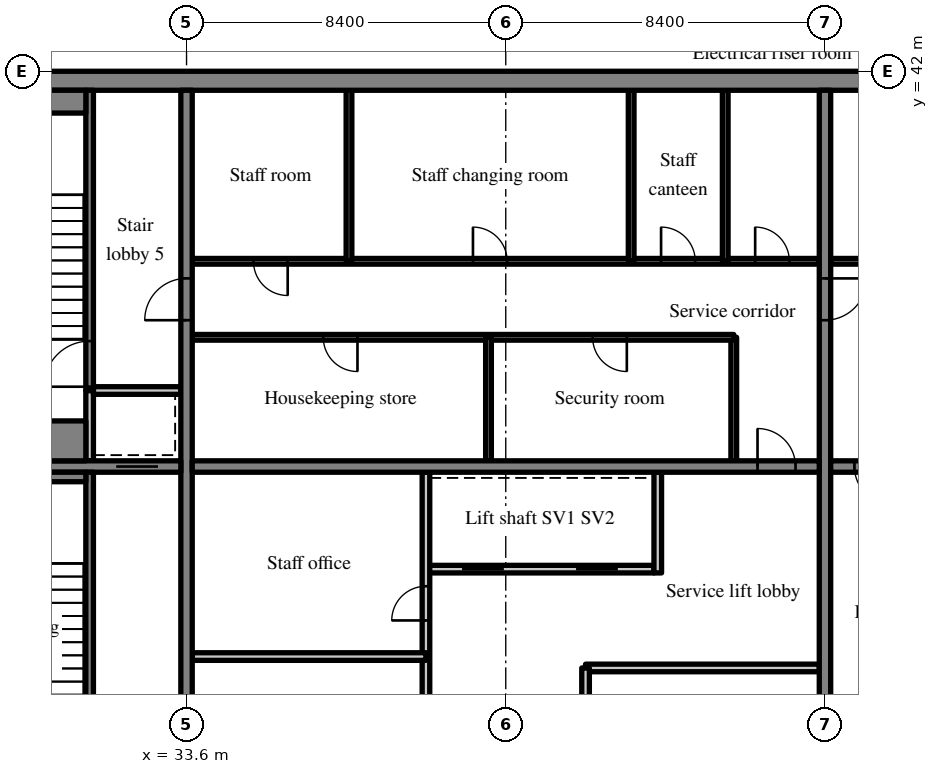
"""IFC4 building model, lengths in metres.
Left out: names, types, materials, properties, quantities, classifications, styles, units other than length and angle.
Written with IfcOpenShell. Run it as: python <this file> out.ifc"""

import sys

from ifc_helpers import new_model, si_unit, direction, frame, frame_2d, origin, place, context, subcontext, project, spatial, rectangle, extrude, source, transform, mapped, element, fill, save


model = new_model("IFC4")
c1 = context("Model", 3, precision=1e-05, world=origin(), true_north=direction((0.0, 1.0)))
c2 = subcontext(c1, "Body", "Model", "MODEL_VIEW")
j1 = project(units=[si_unit("LENGTHUNIT", "METRE"), si_unit("PLANEANGLEUNIT", "RADIAN")], contexts=[c1])
p1 = place(None, origin())
s1 = spatial("IfcSite", under=j1, at=p1, CompositionType="ELEMENT")
p2 = place(p1, origin())
s2 = spatial("IfcBuilding", under=s1, at=p2, CompositionType="ELEMENT")
p3 = place(p2, frame((0.0, 0.0, 305.7)))
s3 = spatial("IfcBuildingStorey", under=s2, at=p3, CompositionType="ELEMENT", Elevation=305.7)
m1 = source(origin(), c2, "Body", "SweptSolid", [
    extrude(rectangle(XDim=50.4, YDim=0.5, at=frame_2d((25.2, 0.0))), origin(), (0.0, 0.0, 1.0), 3.72),
])
p4 = place(p3, frame((25.2, 41.75, 0.0), z_axis=(0.0, 0.0, 1.0), x_axis=(1.0, 0.0, 0.0)))
e1 = element("IfcWall", 1, at=p4, inside=s3, PredefinedType="SHEAR", context=c2, shape_type="MappedRepresentation", body=[
    mapped(m1, transform((0.0, 0.0, 0.0), scale=1.0)),
])
m2 = source(origin(), c2, "Body", "SweptSolid", [
    extrude(rectangle(XDim=19.0, YDim=0.3, at=frame_2d((9.5, 0.0))), origin(), (0.0, 0.0, 1.0), 3.72),
])
p5 = place(p3, frame((33.6, 22.5, 0.0), z_axis=(0.0, 0.0, 1.0), x_axis=(0.0, 1.0, 0.0)))
e2 = element("IfcWall", 2, at=p5, inside=s3, PredefinedType="SHEAR", context=c2, shape_type="MappedRepresentation", body=[
    mapped(m2, transform((0.0, 0.0, 0.0), scale=1.0)),
])
m3 = source(origin(), c2, "Body", "SweptSolid", [
    extrude(rectangle(XDim=1.1, YDim=2.1, at=frame_2d((0.55, 1.05))), frame((0.0, 0.16, 0.0), z_axis=(0.0, -1.0, 0.0), x_axis=(1.0, 0.0, 0.0)), (0.0, 0.0, 1.0), 0.32),
])
p6 = place(p5, frame((12.95, 0.0, 0.0)))
e3 = element("IfcOpeningElement", 3, at=p6, cuts=e2, PredefinedType="OPENING", context=c2, shape_type="MappedRepresentation", body=[
    mapped(m3, transform((0.0, 0.0, 0.0), scale=1.0)),
])
p7 = place(p3, frame((50.4, 22.5, 0.0), z_axis=(0.0, 0.0, 1.0), x_axis=(0.0, 1.0, 0.0)))
e4 = element("IfcWall", 4, at=p7, inside=s3, PredefinedType="SHEAR", context=c2, shape_type="MappedRepresentation", body=[
    mapped(m2, transform((0.0, 0.0, 0.0), scale=1.0)),
])
p8 = place(p7, frame((12.95, 0.0, 0.0)))
e5 = element("IfcOpeningElement", 5, at=p8, cuts=e4, PredefinedType="OPENING", context=c2, shape_type="MappedRepresentation", body=[
    mapped(m3, transform((0.0, 0.0, 0.0), scale=1.0)),
])
m4 = source(origin(), c2, "Body", "SweptSolid", [
    extrude(rectangle(XDim=7.75, YDim=0.3, at=frame_2d((3.875, 0.0))), origin(), (0.0, 0.0, 1.0), 3.72),
])
p9 = place(p3, frame((25.7, 31.6, 0.0), z_axis=(0.0, 0.0, 1.0), x_axis=(1.0, 0.0, 0.0)))
e6 = element("IfcWall", 6, at=p9, inside=s3, PredefinedType="SHEAR", context=c2, shape_type="MappedRepresentation", body=[
    mapped(m4, transform((0.0, 0.0, 0.0), scale=1.0)),
])
p10 = place(p9, frame((6.05, 0.0, 0.0)))
e7 = element("IfcOpeningElement", 7, at=p10, cuts=e6, PredefinedType="OPENING", context=c2, shape_type="MappedRepresentation", body=[
    mapped(m3, transform((0.0, 0.0, 0.0), scale=1.0)),
])
m5 = source(origin(), c2, "Body", "SweptSolid", [
    extrude(rectangle(XDim=16.5, YDim=0.3, at=frame_2d((8.25, 0.0))), origin(), (0.0, 0.0, 1.0), 3.72),
])
p11 = place(p3, frame((33.75, 31.6, 0.0), z_axis=(0.0, 0.0, 1.0), x_axis=(1.0, 0.0, 0.0)))
e8 = element("IfcWall", 8, at=p11, inside=s3, PredefinedType="SHEAR", context=c2, shape_type="MappedRepresentation", body=[
    mapped(m5, transform((0.0, 0.0, 0.0), scale=1.0)),
])
m6 = source(origin(), c2, "Body", "SweptSolid", [
    extrude(rectangle(XDim=1.0, YDim=2.1, at=frame_2d((0.5, 1.05))), frame((0.0, 0.16, 0.0), z_axis=(0.0, -1.0, 0.0), x_axis=(1.0, 0.0, 0.0)), (0.0, 0.0, 1.0), 0.32),
])
p12 = place(p11, frame((14.875, 0.0, 0.0)))
e9 = element("IfcOpeningElement", 9, at=p12, cuts=e8, PredefinedType="OPENING", context=c2, shape_type="MappedRepresentation", body=[
    mapped(m6, transform((0.0, 0.0, 0.0), scale=1.0)),
])
p13 = place(p3, frame((50.55, 31.6, 0.0), z_axis=(0.0, 0.0, 1.0), x_axis=(1.0, 0.0, 0.0)))
e10 = element("IfcWall", 10, at=p13, inside=s3, PredefinedType="SHEAR", context=c2, shape_type="MappedRepresentation", body=[
    mapped(m5, transform((0.0, 0.0, 0.0), scale=1.0)),
])
p14 = place(p13, frame((0.625, 0.0, 0.0)))
e11 = element("IfcOpeningElement", 11, at=p14, cuts=e10, PredefinedType="OPENING", context=c2, shape_type="MappedRepresentation", body=[
    mapped(m6, transform((0.0, 0.0, 0.0), scale=1.0)),
])
m7 = source(origin(), c2, "Body", "SweptSolid", [
    extrude(rectangle(XDim=6.0, YDim=0.2, at=frame_2d((3.0, 0.0))), origin(), (0.0, 0.0, 1.0), 3.72),
])
p15 = place(p3, frame((39.9, 28.9, 0.0), z_axis=(0.0, 0.0, 1.0), x_axis=(1.0, 0.0, 0.0)))
e12 = element("IfcWall", 12, at=p15, inside=s3, PredefinedType="SOLIDWALL", context=c2, shape_type="MappedRepresentation", body=[
    mapped(m7, transform((0.0, 0.0, 0.0), scale=1.0)),
])
m8 = source(origin(), c2, "Body", "SweptSolid", [
    extrude(rectangle(XDim=1.1, YDim=2.1, at=frame_2d((0.55, 1.05))), frame((0.0, 0.11, 0.0), z_axis=(0.0, -1.0, 0.0), x_axis=(1.0, 0.0, 0.0)), (0.0, 0.0, 1.0), 0.22),
])
p16 = place(p15, frame((0.95, 0.0, 0.0)))
e13 = element("IfcOpeningElement", 13, at=p16, cuts=e12, PredefinedType="OPENING", context=c2, shape_type="MappedRepresentation", body=[
    mapped(m8, transform((0.0, 0.0, 0.0), scale=1.0)),
])
p17 = place(p15, frame((3.95, 0.0, 0.0)))
e14 = element("IfcOpeningElement", 14, at=p17, cuts=e12, PredefinedType="OPENING", context=c2, shape_type="MappedRepresentation", body=[
    mapped(m8, transform((0.0, 0.0, 0.0), scale=1.0)),
])
m9 = source(origin(), c2, "Body", "SweptSolid", [
    extrude(rectangle(XDim=8.95, YDim=0.2, at=frame_2d((4.475, 0.0))), origin(), (0.0, 0.0, 1.0), 3.72),
])
p18 = place(p3, frame((39.9, 22.5, 0.0), z_axis=(0.0, 0.0, 1.0), x_axis=(0.0, 1.0, 0.0)))
e15 = element("IfcWall", 15, at=p18, inside=s3, PredefinedType="PARTITIONING", context=c2, shape_type="MappedRepresentation", body=[
    mapped(m9, transform((0.0, 0.0, 0.0), scale=1.0)),
])
m10 = source(origin(), c2, "Body", "SweptSolid", [
    extrude(rectangle(XDim=0.9, YDim=2.1, at=frame_2d((0.45, 1.05))), frame((0.0, 0.11, 0.0), z_axis=(0.0, -1.0, 0.0), x_axis=(1.0, 0.0, 0.0)), (0.0, 0.0, 1.0), 0.22),
])
p19 = place(p18, frame((5.05, 0.0, 0.0)))
e16 = element("IfcOpeningElement", 16, at=p19, cuts=e15, PredefinedType="OPENING", context=c2, shape_type="MappedRepresentation", body=[
    mapped(m10, transform((0.0, 0.0, 0.0), scale=1.0)),
])
m11 = source(origin(), c2, "Body", "SweptSolid", [
    extrude(rectangle(XDim=2.65, YDim=0.2, at=frame_2d((1.325, 0.0))), origin(), (0.0, 0.0, 1.0), 3.72),
])
p20 = place(p3, frame((46.0, 28.8, 0.0), z_axis=(0.0, 0.0, 1.0), x_axis=(0.0, 1.0, 0.0)))
e17 = element("IfcWall", 17, at=p20, inside=s3, PredefinedType="SOLIDWALL", context=c2, shape_type="MappedRepresentation", body=[
    mapped(m11, transform((0.0, 0.0, 0.0), scale=1.0)),
])
m12 = source(origin(), c2, "Body", "SweptSolid", [
    extrude(rectangle(XDim=6.15, YDim=0.2, at=frame_2d((3.075, 0.0))), origin(), (0.0, 0.0, 1.0), 3.72),
])
for number, where, z_axis, x_axis in (
    (18, (33.75, 26.6, 0.0), (0.0, 0.0, 1.0), (1.0, 0.0, 0.0)),
    (19, (44.1, 26.3, 0.0), (0.0, 0.0, 1.0), (1.0, 0.0, 0.0)),
):
    element("IfcWall", number, at=place(p3, frame(where, z_axis=z_axis, x_axis=x_axis)), inside=s3, PredefinedType="PARTITIONING", context=c2, shape_type="MappedRepresentation", body=[
        mapped(m12, transform((0.0, 0.0, 0.0), scale=1.0)),
    ])
m13 = source(origin(), c2, "Body", "SweptSolid", [
    extrude(rectangle(XDim=1.0, YDim=0.2, at=frame_2d((0.5, 0.0))), origin(), (0.0, 0.0, 1.0), 3.72),
])
p21 = place(p3, frame((44.1, 25.3, 0.0), z_axis=(0.0, 0.0, 1.0), x_axis=(0.0, 1.0, 0.0)))
e20 = element("IfcWall", 20, at=p21, inside=s3, PredefinedType="PARTITIONING", context=c2, shape_type="MappedRepresentation", body=[
    mapped(m13, transform((0.0, 0.0, 0.0), scale=1.0)),
])
m14 = source(origin(), c2, "Body", "SweptSolid", [
    extrude(rectangle(XDim=3.25, YDim=0.15, at=frame_2d((1.625, 0.0))), origin(), (0.0, 0.0, 1.0), 3.72),
])
p22 = place(p3, frame((48.0, 31.75, 0.0), z_axis=(0.0, 0.0, 1.0), x_axis=(0.0, 1.0, 0.0)))
e21 = element("IfcWall", 21, at=p22, inside=s3, PredefinedType="PARTITIONING", context=c2, shape_type="MappedRepresentation", body=[
    mapped(m14, transform((0.0, 0.0, 0.0), scale=1.0)),
])
m15 = source(origin(), c2, "Body", "SweptSolid", [
    extrude(rectangle(XDim=14.25, YDim=0.15, at=frame_2d((7.125, 0.0))), origin(), (0.0, 0.0, 1.0), 3.72),
])
p23 = place(p3, frame((33.75, 35.0, 0.0), z_axis=(0.0, 0.0, 1.0), x_axis=(1.0, 0.0, 0.0)))
e22 = element("IfcWall", 22, at=p23, inside=s3, PredefinedType="PARTITIONING", context=c2, shape_type="MappedRepresentation", body=[
    mapped(m15, transform((0.0, 0.0, 0.0), scale=1.0)),
])
m16 = source(origin(), c2, "Body", "SweptSolid", [
    extrude(rectangle(XDim=0.9, YDim=2.1, at=frame_2d((0.45, 1.05))), frame((0.0, 0.085, 0.0), z_axis=(0.0, -1.0, 0.0), x_axis=(1.0, 0.0, 0.0)), (0.0, 0.0, 1.0), 0.17),
])
p24 = place(p23, frame((3.448, 0.0, 0.0)))
e23 = element("IfcOpeningElement", 23, at=p24, cuts=e22, PredefinedType="OPENING", context=c2, shape_type="MappedRepresentation", body=[
    mapped(m16, transform((0.0, 0.0, 0.0), scale=1.0)),
])
p25 = place(p23, frame((10.536, 0.0, 0.0)))
e24 = element("IfcOpeningElement", 24, at=p25, cuts=e22, PredefinedType="OPENING", context=c2, shape_type="MappedRepresentation", body=[
    mapped(m16, transform((0.0, 0.0, 0.0), scale=1.0)),
])
m17 = source(origin(), c2, "Body", "SweptSolid", [
    extrude(rectangle(XDim=16.5, YDim=0.15, at=frame_2d((8.25, 0.0))), origin(), (0.0, 0.0, 1.0), 3.72),
])
p26 = place(p3, frame((33.75, 37.0, 0.0), z_axis=(0.0, 0.0, 1.0), x_axis=(1.0, 0.0, 0.0)))
e25 = element("IfcWall", 25, at=p26, inside=s3, PredefinedType="PARTITIONING", context=c2, shape_type="MappedRepresentation", body=[
    mapped(m17, transform((0.0, 0.0, 0.0), scale=1.0)),
])
p27 = place(p26, frame((1.612, 0.0, 0.0)))
e26 = element("IfcOpeningElement", 26, at=p27, cuts=e25, PredefinedType="OPENING", context=c2, shape_type="MappedRepresentation", body=[
    mapped(m16, transform((0.0, 0.0, 0.0), scale=1.0)),
])
p28 = place(p26, frame((7.387, 0.0, 0.0)))
e27 = element("IfcOpeningElement", 27, at=p28, cuts=e25, PredefinedType="OPENING", context=c2, shape_type="MappedRepresentation", body=[
    mapped(m16, transform((0.0, 0.0, 0.0), scale=1.0)),
])
p29 = place(p26, frame((12.337, 0.0, 0.0)))
e28 = element("IfcOpeningElement", 28, at=p29, cuts=e25, PredefinedType="OPENING", context=c2, shape_type="MappedRepresentation", body=[
    mapped(m16, transform((0.0, 0.0, 0.0), scale=1.0)),
])
p30 = place(p26, frame((14.813, 0.0, 0.0)))
e29 = element("IfcOpeningElement", 29, at=p30, cuts=e25, PredefinedType="OPENING", context=c2, shape_type="MappedRepresentation", body=[
    mapped(m16, transform((0.0, 0.0, 0.0), scale=1.0)),
])
p31 = place(p3, frame((41.546, 31.75, 0.0), z_axis=(0.0, 0.0, 1.0), x_axis=(0.0, 1.0, 0.0)))
e30 = element("IfcWall", 30, at=p31, inside=s3, PredefinedType="PARTITIONING", context=c2, shape_type="MappedRepresentation", body=[
    mapped(m14, transform((0.0, 0.0, 0.0), scale=1.0)),
])
m18 = source(origin(), c2, "Body", "SweptSolid", [
    extrude(rectangle(XDim=4.5, YDim=0.15, at=frame_2d((2.25, 0.0))), origin(), (0.0, 0.0, 1.0), 3.72),
])
for number, where, z_axis, x_axis in (
    (31, (37.875, 37.0, 0.0), (0.0, 0.0, 1.0), (0.0, 1.0, 0.0)),
    (32, (45.3, 37.0, 0.0), (0.0, 0.0, 1.0), (0.0, 1.0, 0.0)),
    (33, (47.775, 37.0, 0.0), (0.0, 0.0, 1.0), (0.0, 1.0, 0.0)),
):
    element("IfcWall", number, at=place(p3, frame(where, z_axis=z_axis, x_axis=x_axis)), inside=s3, PredefinedType="PARTITIONING", context=c2, shape_type="MappedRepresentation", body=[
        mapped(m18, transform((0.0, 0.0, 0.0), scale=1.0)),
    ])
p32 = place(p3, frame((67.05, 37.0, 0.0), z_axis=(0.0, 0.0, 1.0), x_axis=(-1.0, 0.0, 0.0)))
e34 = element("IfcWall", 34, at=p32, inside=s3, PredefinedType="PARTITIONING", context=c2, shape_type="MappedRepresentation", body=[
    mapped(m17, transform((0.0, 0.0, 0.0), scale=1.0)),
])
p33 = place(p32, frame((3.263, 0.0, 0.0)))
e35 = element("IfcOpeningElement", 35, at=p33, cuts=e34, PredefinedType="OPENING", context=c2, shape_type="MappedRepresentation", body=[
    mapped(m16, transform((0.0, 0.0, 0.0), scale=1.0)),
])
p34 = place(p32, frame((8.212, 0.0, 0.0)))
e36 = element("IfcOpeningElement", 36, at=p34, cuts=e34, PredefinedType="OPENING", context=c2, shape_type="MappedRepresentation", body=[
    mapped(m16, transform((0.0, 0.0, 0.0), scale=1.0)),
])
p35 = place(p32, frame((11.513, 0.0, 0.0)))
e37 = element("IfcOpeningElement", 37, at=p35, cuts=e34, PredefinedType="OPENING", context=c2, shape_type="MappedRepresentation", body=[
    mapped(m16, transform((0.0, 0.0, 0.0), scale=1.0)),
])
p36 = place(p32, frame((14.813, 0.0, 0.0)))
e38 = element("IfcOpeningElement", 38, at=p36, cuts=e34, PredefinedType="OPENING", context=c2, shape_type="MappedRepresentation", body=[
    mapped(m16, transform((0.0, 0.0, 0.0), scale=1.0)),
])
m19 = source(origin(), c2, "Body", "SweptSolid", [
    extrude(rectangle(XDim=8.95, YDim=0.2, at=frame_2d((4.475, 0.0))), origin(), (0.0, 0.0, 1.0), 3.72),
])
p37 = place(p3, frame((31.05, 22.5, 0.0), z_axis=(0.0, 0.0, 1.0), x_axis=(0.0, 1.0, 0.0)))
e39 = element("IfcWall", 39, at=p37, inside=s3, PredefinedType="SOLIDWALL", context=c2, shape_type="MappedRepresentation", body=[
    mapped(m19, transform((0.0, 0.0, 0.0), scale=1.0)),
])
m20 = source(origin(), c2, "Body", "SweptSolid", [
    extrude(rectangle(XDim=1.2, YDim=2.1, at=frame_2d((0.6, 1.05))), frame((0.0, 0.11, 0.0), z_axis=(0.0, -1.0, 0.0), x_axis=(1.0, 0.0, 0.0)), (0.0, 0.0, 1.0), 0.22),
])
p38 = place(p37, frame((1.1, 0.0, 0.0)))
e40 = element("IfcOpeningElement", 40, at=p38, cuts=e39, PredefinedType="OPENING", context=c2, shape_type="MappedRepresentation", body=[
    mapped(m20, transform((0.0, 0.0, 0.0), scale=1.0)),
])
m21 = source(origin(), c2, "Body", "SweptSolid", [
    extrude(rectangle(XDim=1.85, YDim=0.2, at=frame_2d((0.925, 0.0))), origin(), (0.0, 0.0, 1.0), 3.72),
])
p39 = place(p3, frame((31.05, 31.75, 0.0), z_axis=(0.0, 0.0, 1.0), x_axis=(0.0, 1.0, 0.0)))
e41 = element("IfcWall", 41, at=p39, inside=s3, PredefinedType="SOLIDWALL", context=c2, shape_type="MappedRepresentation", body=[
    mapped(m21, transform((0.0, 0.0, 0.0), scale=1.0)),
])
m22 = source(origin(), c2, "Body", "SweptSolid", [
    extrude(rectangle(XDim=2.3, YDim=0.2, at=frame_2d((1.15, 0.0))), origin(), (0.0, 0.0, 1.0), 3.72),
])
p40 = place(p3, frame((31.15, 33.6, 0.0), z_axis=(0.0, 0.0, 1.0), x_axis=(1.0, 0.0, 0.0)))
e42 = element("IfcWall", 42, at=p40, inside=s3, PredefinedType="SOLIDWALL", context=c2, shape_type="MappedRepresentation", body=[
    mapped(m22, transform((0.0, 0.0, 0.0), scale=1.0)),
])
m23 = source(origin(), c2, "Body", "SweptSolid", [
    extrude(rectangle(XDim=7.9, YDim=0.2, at=frame_2d((3.95, 0.0))), origin(), (0.0, 0.0, 1.0), 3.72),
])
p41 = place(p3, frame((31.05, 33.6, 0.0), z_axis=(0.0, 0.0, 1.0), x_axis=(0.0, 1.0, 0.0)))
e43 = element("IfcWall", 43, at=p41, inside=s3, PredefinedType="SOLIDWALL", context=c2, shape_type="MappedRepresentation", body=[
    mapped(m23, transform((0.0, 0.0, 0.0), scale=1.0)),
])
p42 = place(p41, frame((0.1, 0.0, 0.0)))
e44 = element("IfcOpeningElement", 44, at=p42, cuts=e43, PredefinedType="OPENING", context=c2, shape_type="MappedRepresentation", body=[
    mapped(m20, transform((0.0, 0.0, 0.0), scale=1.0)),
])
m24 = source(origin(), c2, "Body", "SweptSolid", [
    extrude(rectangle(XDim=5.25, YDim=0.25, at=frame_2d((2.625, 0.0))), origin(), (0.0, 0.0, 1.0), 3.72),
])
p43 = place(p3, frame((25.7, 31.325, 0.0), z_axis=(0.0, 0.0, 1.0), x_axis=(1.0, 0.0, 0.0)))
e45 = element("IfcWall", 45, at=p43, inside=s3, PredefinedType="SOLIDWALL", context=c2, shape_type="MappedRepresentation", body=[
    mapped(m24, transform((0.0, 0.0, 0.0), scale=1.0)),
])
m25 = source(origin(), c2, "Body", "SweptSolid", [
    extrude(rectangle(XDim=5.25, YDim=0.6, at=frame_2d((2.625, 0.0))), origin(), (0.0, 0.0, 1.0), 3.72),
])
p44 = place(p3, frame((25.7, 41.2, 0.0), z_axis=(0.0, 0.0, 1.0), x_axis=(1.0, 0.0, 0.0)))
e46 = element("IfcWall", 46, at=p44, inside=s3, PredefinedType="SOLIDWALL", context=c2, shape_type="MappedRepresentation", body=[
    mapped(m25, transform((0.0, 0.0, 0.0), scale=1.0)),
])
m26 = source(origin(), c2, "Body", "SweptSolid", [
    extrude(rectangle(XDim=5.25, YDim=1.05, at=frame_2d((2.625, 0.0))), origin(), (0.0, 0.0, 1.0), 3.72),
])
p45 = place(p3, frame((25.7, 32.275, 0.0), z_axis=(0.0, 0.0, 1.0), x_axis=(1.0, 0.0, 0.0)))
e47 = element("IfcWall", 47, at=p45, inside=s3, PredefinedType="SOLIDWALL", context=c2, shape_type="MappedRepresentation", body=[
    mapped(m26, transform((0.0, 0.0, 0.0), scale=1.0)),
])
m27 = source(origin(), c2, "Body", "SweptSolid", [
    extrude(rectangle(XDim=1.0, YDim=2.1, at=frame_2d((0.5, 1.05))), frame((0.0, 0.025, 0.0), z_axis=(0.0, -1.0, 0.0), x_axis=(1.0, 0.0, 0.0)), (0.0, 0.0, 1.0), 0.05),
])
p46 = place(p12, origin())
e48 = element("IfcDoor", 48, at=p46, inside=s3, OperationType="SINGLE_SWING_LEFT", PredefinedType="DOOR", context=c2, shape_type="MappedRepresentation", body=[
    mapped(m27, transform((0.0, 0.0, 0.0), scale=1.0)),
])
fill(e9, e48)
m28 = source(origin(), c2, "Body", "SweptSolid", [
    extrude(rectangle(XDim=1.1, YDim=2.1, at=frame_2d((0.55, 1.05))), frame((0.0, 0.025, 0.0), z_axis=(0.0, -1.0, 0.0), x_axis=(1.0, 0.0, 0.0)), (0.0, 0.0, 1.0), 0.05),
])
p47 = place(p16, origin())
e49 = element("IfcDoor", 49, at=p47, inside=s3, OperationType="SLIDING_TO_LEFT", PredefinedType="DOOR", context=c2, shape_type="MappedRepresentation", body=[
    mapped(m28, transform((0.0, 0.0, 0.0), scale=1.0)),
])
fill(e13, e49)
p48 = place(p17, origin())
e50 = element("IfcDoor", 50, at=p48, inside=s3, OperationType="SLIDING_TO_RIGHT", PredefinedType="DOOR", context=c2, shape_type="MappedRepresentation", body=[
    mapped(m28, transform((0.0, 0.0, 0.0), scale=1.0)),
])
fill(e14, e50)
m29 = source(origin(), c2, "Body", "SweptSolid", [
    extrude(rectangle(XDim=0.9, YDim=2.1, at=frame_2d((0.45, 1.05))), frame((0.0, 0.025, 0.0), z_axis=(0.0, -1.0, 0.0), x_axis=(1.0, 0.0, 0.0)), (0.0, 0.0, 1.0), 0.05),
])
p49 = place(p19, origin())
e51 = element("IfcDoor", 51, at=p49, inside=s3, OperationType="SINGLE_SWING_LEFT", PredefinedType="DOOR", context=c2, shape_type="MappedRepresentation", body=[
    mapped(m29, transform((0.0, 0.0, 0.0), scale=1.0)),
])
fill(e16, e51)
p50 = place(p24, origin())
e52 = element("IfcDoor", 52, at=p50, inside=s3, OperationType="SINGLE_SWING_RIGHT", PredefinedType="DOOR", context=c2, shape_type="MappedRepresentation", body=[
    mapped(m29, transform((0.0, 0.0, 0.0), scale=1.0)),
])
fill(e23, e52)
p51 = place(p25, origin())
e53 = element("IfcDoor", 53, at=p51, inside=s3, OperationType="SINGLE_SWING_RIGHT", PredefinedType="DOOR", context=c2, shape_type="MappedRepresentation", body=[
    mapped(m29, transform((0.0, 0.0, 0.0), scale=1.0)),
])
fill(e24, e53)
p52 = place(p27, origin())
e54 = element("IfcDoor", 54, at=p52, inside=s3, OperationType="SINGLE_SWING_RIGHT", PredefinedType="DOOR", context=c2, shape_type="MappedRepresentation", body=[
    mapped(m29, transform((0.0, 0.0, 0.0), scale=1.0)),
])
fill(e26, e54)
p53 = place(p28, origin())
e55 = element("IfcDoor", 55, at=p53, inside=s3, OperationType="SINGLE_SWING_LEFT", PredefinedType="DOOR", context=c2, shape_type="MappedRepresentation", body=[
    mapped(m29, transform((0.0, 0.0, 0.0), scale=1.0)),
])
fill(e27, e55)
p54 = place(p29, origin())
e56 = element("IfcDoor", 56, at=p54, inside=s3, OperationType="SINGLE_SWING_LEFT", PredefinedType="DOOR", context=c2, shape_type="MappedRepresentation", body=[
    mapped(m29, transform((0.0, 0.0, 0.0), scale=1.0)),
])
fill(e28, e56)
p55 = place(p30, origin())
e57 = element("IfcDoor", 57, at=p55, inside=s3, OperationType="SINGLE_SWING_LEFT", PredefinedType="DOOR", context=c2, shape_type="MappedRepresentation", body=[
    mapped(m29, transform((0.0, 0.0, 0.0), scale=1.0)),
])
fill(e29, e57)
p56 = place(p14, origin())
e58 = element("IfcDoor", 58, at=p56, inside=s3, OperationType="SINGLE_SWING_RIGHT", PredefinedType="DOOR", context=c2, shape_type="MappedRepresentation", body=[
    mapped(m27, transform((0.0, 0.0, 0.0), scale=1.0)),
])
fill(e11, e58)
p57 = place(p10, origin())
e59 = element("IfcDoor", 59, at=p57, inside=s3, OperationType="SLIDING_TO_LEFT", PredefinedType="DOOR", context=c2, shape_type="MappedRepresentation", body=[
    mapped(m28, transform((0.0, 0.0, 0.0), scale=1.0)),
])
fill(e7, e59)
m30 = source(origin(), c2, "Body", "SweptSolid", [
    extrude(rectangle(XDim=1.2, YDim=2.1, at=frame_2d((0.6, 1.05))), frame((0.0, 0.025, 0.0), z_axis=(0.0, -1.0, 0.0), x_axis=(1.0, 0.0, 0.0)), (0.0, 0.0, 1.0), 0.05),
])
p58 = place(p42, origin())
e60 = element("IfcDoor", 60, at=p58, inside=s3, OperationType="SINGLE_SWING_LEFT", PredefinedType="DOOR", context=c2, shape_type="MappedRepresentation", body=[
    mapped(m30, transform((0.0, 0.0, 0.0), scale=1.0)),
])
fill(e44, e60)
p59 = place(p6, origin())
e61 = element("IfcDoor", 61, at=p59, inside=s3, OperationType="SINGLE_SWING_LEFT", PredefinedType="DOOR", context=c2, shape_type="MappedRepresentation", body=[
    mapped(m28, transform((0.0, 0.0, 0.0), scale=1.0)),
])
fill(e3, e61)
p60 = place(p8, origin())
e62 = element("IfcDoor", 62, at=p60, inside=s3, OperationType="SINGLE_SWING_RIGHT", PredefinedType="DOOR", context=c2, shape_type="MappedRepresentation", body=[
    mapped(m28, transform((0.0, 0.0, 0.0), scale=1.0)),
])
fill(e5, e62)
save(model, sys.argv[1])
